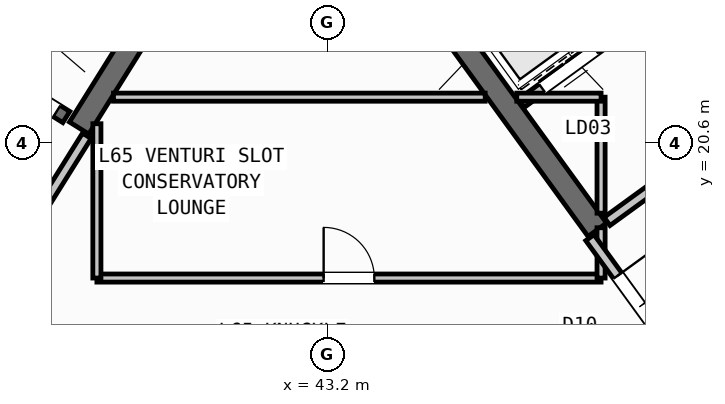
"""IFC4 building model, lengths in metres.
Left out: names, types, materials, properties, quantities, classifications, styles, units other than length and angle.
Written with IfcOpenShell. Run it as: python <this file> out.ifc"""

import sys

from ifc_helpers import new_model, si_unit, direction, frame, frame_2d, origin, place, context, subcontext, project, spatial, rectangle, extrude, source, transform, mapped, element, fill, save


model = new_model("IFC4")
c1 = context("Model", 3, precision=1e-05, world=origin(), true_north=direction((0.0, 1.0)))
c2 = subcontext(c1, "Body", "Model", "MODEL_VIEW")
j1 = project(units=[si_unit("LENGTHUNIT", "METRE"), si_unit("PLANEANGLEUNIT", "RADIAN")], contexts=[c1])
p1 = place(None, origin())
s1 = spatial("IfcSite", under=j1, at=p1, CompositionType="ELEMENT")
p2 = place(p1, origin())
s2 = spatial("IfcBuilding", under=s1, at=p2, CompositionType="ELEMENT")
p3 = place(p2, frame((0.0, 0.0, 259.2)))
s3 = spatial("IfcBuildingStorey", under=s2, at=p3, CompositionType="ELEMENT", Elevation=259.2)
p4 = place(p3, frame((40.221, 23.965, 0.0), z_axis=(0.0, 0.0, 1.0), x_axis=(-0.529902075036, -0.848058836916, 0.0)))
e1 = element("IfcWall", 1, at=p4, inside=s3, PredefinedType="SHEAR", context=c2, shape_type="SweptSolid", body=[
    extrude(rectangle(XDim=3.625, YDim=0.45, at=frame_2d((1.812, 0.0))), origin(), (0.0, 0.0, 1.0), 3.35),
])
p5 = place(p3, frame((48.526, 18.884, 0.0), z_axis=(0.0, 0.0, 1.0), x_axis=(-0.587774812919, 0.809024578921, 0.0)))
e2 = element("IfcWall", 2, at=p5, inside=s3, PredefinedType="SHEAR", context=c2, shape_type="SweptSolid", body=[
    extrude(rectangle(XDim=6.475, YDim=0.45, at=frame_2d((3.238, 0.0))), origin(), (0.0, 0.0, 1.0), 3.35),
])
p6 = place(p3, frame((38.046, 21.108, 0.0), z_axis=(0.0, 0.0, 1.0), x_axis=(-0.848054434086, 0.529909121291, 0.0)))
e3 = element("IfcWall", 3, at=p6, inside=s3, PredefinedType="SHEAR", context=c2, shape_type="SweptSolid", body=[
    extrude(rectangle(XDim=7.33, YDim=0.26, at=frame_2d((3.665, 0.0))), origin(), (0.0, 0.0, 1.0), 3.35),
])
p7 = place(p6, frame((0.22, 0.0, 0.0)))
e4 = element("IfcOpeningElement", 4, at=p7, cuts=e3, PredefinedType="OPENING", context=c2, shape_type="SweptSolid", body=[
    extrude(rectangle(XDim=1.1, YDim=2.1, at=frame_2d((0.55, 1.05))), frame((0.0, 0.14, 0.0), z_axis=(0.0, -1.0, 0.0), x_axis=(1.0, 0.0, 0.0)), (0.0, 0.0, 1.0), 0.28),
])
p8 = place(p3, frame((47.025, 21.378, 0.0), z_axis=(0.0, 0.0, 1.0), x_axis=(0.809052869724, 0.587735870941, 0.0)))
e5 = element("IfcWall", 5, at=p8, inside=s3, PredefinedType="STANDARD", context=c2, shape_type="SweptSolid", body=[
    extrude(rectangle(XDim=3.498, YDim=0.2, at=frame_2d((1.749, 0.0))), origin(), (0.0, 0.0, 1.0), 3.34),
])
p9 = place(p8, frame((0.508, 0.0, 0.0)))
e6 = element("IfcOpeningElement", 6, at=p9, cuts=e5, PredefinedType="OPENING", context=c2, shape_type="SweptSolid", body=[
    extrude(rectangle(XDim=1.3, YDim=2.2, at=frame_2d((0.65, 1.1))), frame((0.0, 0.11, 0.0), z_axis=(0.0, -1.0, 0.0), x_axis=(1.0, 0.0, 0.0)), (0.0, 0.0, 1.0), 0.22),
])
p10 = place(p3, frame((48.718, 19.048, 0.0), z_axis=(0.0, 0.0, 1.0), x_axis=(0.809017261719, 0.587784884325, 0.0)))
e7 = element("IfcWall", 7, at=p10, inside=s3, PredefinedType="STANDARD", context=c2, shape_type="SweptSolid", body=[
    extrude(rectangle(XDim=5.818, YDim=0.2, at=frame_2d((2.909, 0.0))), origin(), (0.0, 0.0, 1.0), 3.34),
])
p11 = place(p10, frame((2.598, 0.0, 0.0)))
e8 = element("IfcOpeningElement", 8, at=p11, cuts=e7, PredefinedType="OPENING", context=c2, shape_type="SweptSolid", body=[
    extrude(rectangle(XDim=1.15, YDim=2.1, at=frame_2d((0.575, 1.05))), frame((0.0, 0.11, 0.0), z_axis=(0.0, -1.0, 0.0), x_axis=(1.0, 0.0, 0.0)), (0.0, 0.0, 1.0), 0.22),
])
p12 = place(p3, frame((38.451, 20.737, 0.0), z_axis=(0.0, 0.0, 1.0), x_axis=(-0.529924799939, -0.848044637038, 0.0)))
e9 = element("IfcWall", 9, at=p12, inside=s3, PredefinedType="STANDARD", context=c2, shape_type="SweptSolid", body=[
    extrude(rectangle(XDim=2.96, YDim=0.2, at=frame_2d((1.48, 0.0))), origin(), (0.0, 0.0, 1.0), 3.34),
])
p13 = place(p12, frame((1.46, 0.0, 0.0)))
e10 = element("IfcOpeningElement", 10, at=p13, cuts=e9, PredefinedType="OPENING", context=c2, shape_type="SweptSolid", body=[
    extrude(rectangle(XDim=0.86, YDim=2.05, at=frame_2d((0.43, 1.025))), frame((0.0, 0.11, 0.0), z_axis=(0.0, -1.0, 0.0), x_axis=(1.0, 0.0, 0.0)), (0.0, 0.0, 1.0), 0.22),
])
p14 = place(p3, frame((38.65, 17.93, 0.0), z_axis=(0.0, 0.0, 1.0), x_axis=(1.0, 0.0, 0.0)))
e11 = element("IfcWall", 11, at=p14, inside=s3, PredefinedType="PARTITIONING", context=c2, shape_type="SweptSolid", body=[
    extrude(rectangle(XDim=9.95, YDim=0.16, at=frame_2d((4.975, 0.0))), origin(), (0.0, 0.0, 1.0), 3.34),
])
p15 = place(p14, frame((4.475, 0.0, 0.0)))
e12 = element("IfcOpeningElement", 12, at=p15, cuts=e11, PredefinedType="OPENING", context=c2, shape_type="SweptSolid", body=[
    extrude(rectangle(XDim=1.0, YDim=2.1, at=frame_2d((0.5, 1.05))), frame((0.0, 0.09, 0.0), z_axis=(0.0, -1.0, 0.0), x_axis=(1.0, 0.0, 0.0)), (0.0, 0.0, 1.0), 0.18),
])
p16 = place(p3, frame((38.65, 17.93, 0.0), z_axis=(0.0, 0.0, 1.0), x_axis=(0.0, 1.0, 0.0)))
e13 = element("IfcWall", 13, at=p16, inside=s3, PredefinedType="PARTITIONING", context=c2, shape_type="SweptSolid", body=[
    extrude(rectangle(XDim=3.046, YDim=0.16, at=frame_2d((1.523, 0.0))), origin(), (0.0, 0.0, 1.0), 3.34),
])
p17 = place(p3, frame((48.6, 17.93, 0.0), z_axis=(0.0, 0.0, 1.0), x_axis=(0.0, 1.0, 0.0)))
e14 = element("IfcWall", 14, at=p17, inside=s3, PredefinedType="PARTITIONING", context=c2, shape_type="SweptSolid", body=[
    extrude(rectangle(XDim=0.993, YDim=0.16, at=frame_2d((0.496, 0.0))), origin(), (0.0, 0.0, 1.0), 3.34),
])
p18 = place(p3, frame((48.6, 19.21, 0.0), z_axis=(0.0, 0.0, 1.0), x_axis=(0.0, 1.0, 0.0)))
e15 = element("IfcWall", 15, at=p18, inside=s3, PredefinedType="PARTITIONING", context=c2, shape_type="SweptSolid", body=[
    extrude(rectangle(XDim=2.29, YDim=0.16, at=frame_2d((1.145, 0.0))), origin(), (0.0, 0.0, 1.0), 3.34),
])
p19 = place(p3, frame((38.978, 21.5, 0.0), z_axis=(0.0, 0.0, 1.0), x_axis=(1.0, 0.0, 0.0)))
e16 = element("IfcWall", 16, at=p19, inside=s3, PredefinedType="PARTITIONING", context=c2, shape_type="SweptSolid", body=[
    extrude(rectangle(XDim=7.336, YDim=0.16, at=frame_2d((3.668, 0.0))), origin(), (0.0, 0.0, 1.0), 3.34),
])
p20 = place(p3, frame((46.936, 21.5, 0.0), z_axis=(0.0, 0.0, 1.0), x_axis=(1.0, 0.0, 0.0)))
e17 = element("IfcWall", 17, at=p20, inside=s3, PredefinedType="PARTITIONING", context=c2, shape_type="SweptSolid", body=[
    extrude(rectangle(XDim=1.664, YDim=0.16, at=frame_2d((0.832, 0.0))), origin(), (0.0, 0.0, 1.0), 3.34),
])
p21 = place(p3, frame((50.119, 16.333, 0.0), z_axis=(0.0, 0.0, 1.0), x_axis=(-0.587749856981, 0.809042709391, 0.0)))
e18 = element("IfcWall", 18, at=p21, inside=s3, PredefinedType="STANDARD", context=c2, shape_type="SweptSolid", body=[
    extrude(rectangle(XDim=2.96, YDim=0.2, at=frame_2d((1.48, 0.0))), origin(), (0.0, 0.0, 1.0), 3.34),
])
p22 = place(p21, frame((0.53, 0.0, 0.0)))
e19 = element("IfcOpeningElement", 19, at=p22, cuts=e18, PredefinedType="OPENING", context=c2, shape_type="SweptSolid", body=[
    extrude(rectangle(XDim=1.5, YDim=2.15, at=frame_2d((0.75, 1.075))), frame((0.0, 0.11, 0.0), z_axis=(0.0, -1.0, 0.0), x_axis=(1.0, 0.0, 0.0)), (0.0, 0.0, 1.0), 0.22),
])
m1 = source(origin(), c2, "Body", "SweptSolid", [
    extrude(rectangle(XDim=1.1, YDim=2.1, at=frame_2d((0.55, 1.05))), frame((0.0, 0.025, 0.0), z_axis=(0.0, -1.0, 0.0), x_axis=(1.0, 0.0, 0.0)), (0.0, 0.0, 1.0), 0.05),
])
p23 = place(p7, origin())
e20 = element("IfcDoor", 20, at=p23, inside=s3, OperationType="SINGLE_SWING_RIGHT", PredefinedType="DOOR", context=c2, shape_type="MappedRepresentation", body=[
    mapped(m1, transform((0.0, 0.0, 0.0), scale=1.0)),
])
fill(e4, e20)
m2 = source(origin(), c2, "Body", "SweptSolid", [
    extrude(rectangle(XDim=1.3, YDim=2.2, at=frame_2d((0.65, 1.1))), frame((0.0, 0.025, 0.0), z_axis=(0.0, -1.0, 0.0), x_axis=(1.0, 0.0, 0.0)), (0.0, 0.0, 1.0), 0.05),
])
p24 = place(p9, origin())
e21 = element("IfcDoor", 21, at=p24, inside=s3, OperationType="DOUBLE_DOOR_SLIDING", PredefinedType="DOOR", context=c2, shape_type="MappedRepresentation", body=[
    mapped(m2, transform((0.0, 0.0, 0.0), scale=1.0)),
])
fill(e6, e21)
m3 = source(origin(), c2, "Body", "SweptSolid", [
    extrude(rectangle(XDim=1.0, YDim=2.1, at=frame_2d((0.5, 1.05))), frame((0.0, 0.025, 0.0), z_axis=(0.0, -1.0, 0.0), x_axis=(1.0, 0.0, 0.0)), (0.0, 0.0, 1.0), 0.05),
])
p25 = place(p15, origin())
e22 = element("IfcDoor", 22, at=p25, inside=s3, OperationType="SINGLE_SWING_LEFT", PredefinedType="DOOR", context=c2, shape_type="MappedRepresentation", body=[
    mapped(m3, transform((0.0, 0.0, 0.0), scale=1.0)),
])
fill(e12, e22)
m4 = source(origin(), c2, "Body", "SweptSolid", [
    extrude(rectangle(XDim=1.5, YDim=2.15, at=frame_2d((0.75, 1.075))), frame((0.0, 0.025, 0.0), z_axis=(0.0, -1.0, 0.0), x_axis=(1.0, 0.0, 0.0)), (0.0, 0.0, 1.0), 0.05),
])
p26 = place(p22, frame((1.5, 0.0, 0.0), z_axis=(0.0, 0.0, 1.0), x_axis=(-1.0, 0.0, 0.0)))
e23 = element("IfcDoor", 23, at=p26, inside=s3, OperationType="DOUBLE_DOOR_SINGLE_SWING", PredefinedType="DOOR", context=c2, shape_type="MappedRepresentation", body=[
    mapped(m4, transform((0.0, 0.0, 0.0), scale=1.0)),
])
fill(e19, e23)
save(model, sys.argv[1])
